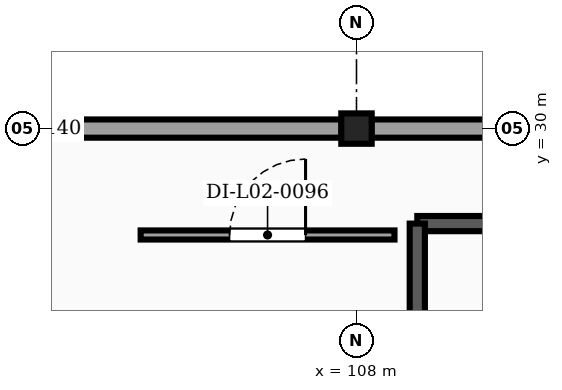
"""IFC4 building model, lengths in metres.
Left out: names, types, materials, properties, quantities, classifications, styles, units other than length and angle.
Written with IfcOpenShell. Run it as: python <this file> out.ifc"""

import sys

from ifc_helpers import new_model, si_unit, direction, frame, frame_2d, origin, origin_2d, place, context, subcontext, project, spatial, rectangle, extrude, element, fill, save


model = new_model("IFC4")
c1 = context("Model", 3, precision=1e-05, world=origin(), true_north=direction((0.0, 1.0)))
c2 = subcontext(c1, "Body", "Model", "MODEL_VIEW")
j1 = project(units=[si_unit("LENGTHUNIT", "METRE"), si_unit("PLANEANGLEUNIT", "RADIAN")], contexts=[c1])
p1 = place(None, origin())
s1 = spatial("IfcSite", under=j1, at=p1, CompositionType="ELEMENT")
p2 = place(p1, origin())
s2 = spatial("IfcBuilding", under=s1, at=p2, CompositionType="ELEMENT")
p3 = place(p2, frame((0.0, 0.0, 8.5)))
s3 = spatial("IfcBuildingStorey", under=s2, at=p3, CompositionType="ELEMENT", Elevation=8.5)
p4 = place(p3, frame((108.0, 30.0, 0.0), z_axis=(0.0, 0.0, 1.0), x_axis=(1.0, 0.0, 0.0)))
e1 = element("IfcColumn", 1, at=p4, inside=s3, PredefinedType="COLUMN", context=c2, shape_type="SweptSolid", body=[
    extrude(rectangle(XDim=0.4, YDim=0.4, at=origin_2d()), origin(), (0.0, 0.0, 1.0), 3.42),
])
for number, where, z_axis, x_axis in (
    (2, (99.196, 30.0, 0.0), (0.0, 0.0, 1.0), (1.0, 0.0, 0.0)),
    (3, (108.196, 30.0, 0.0), (0.0, 0.0, 1.0), (1.0, 0.0, 0.0)),
):
    element("IfcWall", number, at=place(p3, frame(where, z_axis=z_axis, x_axis=x_axis)), inside=s3, PredefinedType="SOLIDWALL", context=c2, shape_type="SweptSolid", body=[
        extrude(rectangle(XDim=8.608, YDim=0.24, at=frame_2d((4.304, 0.0))), origin(), (0.0, 0.0, 1.0), 2.827),
    ])
p5 = place(p3, frame((116.2, 28.75, 0.0), z_axis=(0.0, 0.0, 1.0), x_axis=(-1.0, 0.0, 0.0)))
e4 = element("IfcWall", 4, at=p5, inside=s3, PredefinedType="SHEAR", context=c2, shape_type="SweptSolid", body=[
    extrude(rectangle(XDim=7.4, YDim=0.2, at=frame_2d((3.7, 0.0))), origin(), (0.0, 0.0, 1.0), 3.42),
])
p6 = place(p3, frame((108.8, 28.75, 0.0), z_axis=(0.0, 0.0, 1.0), x_axis=(0.0, -1.0, 0.0)))
e5 = element("IfcWall", 5, at=p6, inside=s3, PredefinedType="SHEAR", context=c2, shape_type="SweptSolid", body=[
    extrude(rectangle(XDim=5.0, YDim=0.2, at=frame_2d((2.5, 0.0))), origin(), (0.0, 0.0, 1.0), 3.42),
])
p7 = place(p6, frame((1.75, 0.0, 0.0)))
e6 = element("IfcOpeningElement", 6, at=p7, cuts=e5, PredefinedType="OPENING", context=c2, shape_type="SweptSolid", body=[
    extrude(rectangle(XDim=1.5, YDim=2.15, at=frame_2d((0.75, 1.075))), frame((0.0, 0.11, 0.0), z_axis=(0.0, -1.0, 0.0), x_axis=(1.0, 0.0, 0.0)), (0.0, 0.0, 1.0), 0.22),
])
p8 = place(p3, frame((105.16, 28.6, 0.0), z_axis=(0.0, 0.0, 1.0), x_axis=(1.0, 0.0, 0.0)))
e7 = element("IfcWall", 7, at=p8, inside=s3, PredefinedType="PARTITIONING", context=c2, shape_type="SweptSolid", body=[
    extrude(rectangle(XDim=3.34, YDim=0.12, at=frame_2d((1.67, 0.0))), origin(), (0.0, 0.0, 1.0), 3.42),
])
p9 = place(p8, frame((1.17, 0.0, 0.0)))
e8 = element("IfcOpeningElement", 8, at=p9, cuts=e7, PredefinedType="OPENING", context=c2, shape_type="SweptSolid", body=[
    extrude(rectangle(XDim=1.0, YDim=2.15, at=frame_2d((0.5, 1.075))), frame((0.0, 0.07, 0.0), z_axis=(0.0, -1.0, 0.0), x_axis=(1.0, 0.0, 0.0)), (0.0, 0.0, 1.0), 0.14),
])
p10 = place(p9, origin())
e9 = element("IfcDoor", 9, at=p10, inside=s3, OperationType="SINGLE_SWING_RIGHT", PredefinedType="DOOR", context=c2, shape_type="SweptSolid", body=[
    extrude(rectangle(XDim=1.0, YDim=2.15, at=frame_2d((0.5, 1.075))), frame((0.0, 0.025, 0.0), z_axis=(0.0, -1.0, 0.0), x_axis=(1.0, 0.0, 0.0)), (0.0, 0.0, 1.0), 0.05),
])
fill(e8, e9)
save(model, sys.argv[1])
